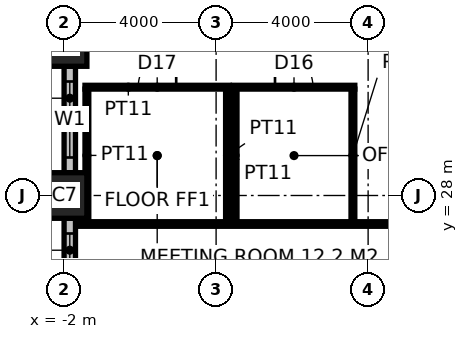
"""IFC4 building model, lengths in metres.
Left out: names, types, materials, properties, quantities, classifications, styles, units other than length and angle.
Written with IfcOpenShell. Run it as: python <this file> out.ifc"""

import sys

from ifc_helpers import new_model, si_unit, direction, frame, frame_2d, origin, origin_2d, place, context, subcontext, project, spatial, rectangle, hollow_rectangle, extrude, element, fill, save


model = new_model("IFC4")
c1 = context("Model", 3, precision=1e-05, world=origin(), true_north=direction((0.0, 1.0)))
c2 = subcontext(c1, "Body", "Model", "MODEL_VIEW")
j1 = project(units=[si_unit("LENGTHUNIT", "METRE"), si_unit("PLANEANGLEUNIT", "RADIAN")], contexts=[c1])
p1 = place(None, origin())
s1 = spatial("IfcSite", under=j1, at=p1, CompositionType="ELEMENT")
p2 = place(p1, origin())
s2 = spatial("IfcBuilding", under=s1, at=p2, CompositionType="ELEMENT")
p3 = place(p2, frame((0.0, 0.0, 15.0)))
s3 = spatial("IfcBuildingStorey", under=s2, at=p3, CompositionType="ELEMENT", Elevation=15.0)
for number, where, z_axis, x_axis in (
    (1, (-2.0, 28.0, 0.0), (0.0, 0.0, 1.0), (1.0, 0.0, 0.0)),
    (2, (-2.0, 32.0, 0.0), (0.0, 0.0, 1.0), (1.0, 0.0, 0.0)),
):
    element("IfcColumn", number, at=place(p3, frame(where, z_axis=z_axis, x_axis=x_axis)), inside=s3, PredefinedType="COLUMN", context=c2, shape_type="SweptSolid", body=[
        extrude(hollow_rectangle(XDim=1.2, YDim=1.2, WallThickness=0.1, at=origin_2d()), origin(), (0.0, 0.0, 1.0), 4.0),
    ])
p4 = place(p3, frame((-1.7, 27.25, 0.0), z_axis=(0.0, 0.0, 1.0), x_axis=(1.0, 0.0, 0.0)))
e3 = element("IfcWall", 3, at=p4, inside=s3, PredefinedType="PARTITIONING", context=c2, shape_type="SweptSolid", body=[
    extrude(rectangle(XDim=17.325, YDim=0.12, at=frame_2d((8.663, 0.0))), origin(), (0.0, 0.0, 1.0), 3.85),
])
p5 = place(p3, frame((-1.45, 30.85, 0.0), z_axis=(0.0, 0.0, 1.0), x_axis=(1.0, 0.0, 0.0)))
e4 = element("IfcWall", 4, at=p5, inside=s3, PredefinedType="PARTITIONING", context=c2, shape_type="SweptSolid", body=[
    extrude(rectangle(XDim=3.8, YDim=0.1, at=frame_2d((1.9, 0.0))), origin(), (0.0, 0.0, 1.0), 3.85),
])
p6 = place(p5, frame((1.4, 0.0, 0.0)))
e5 = element("IfcOpeningElement", 5, at=p6, cuts=e4, PredefinedType="OPENING", context=c2, shape_type="SweptSolid", body=[
    extrude(rectangle(XDim=1.0, YDim=2.2, at=frame_2d((0.5, 1.1))), frame((0.0, 0.06, 0.0), z_axis=(0.0, -1.0, 0.0), x_axis=(1.0, 0.0, 0.0)), (0.0, 0.0, 1.0), 0.12),
])
p7 = place(p3, frame((2.45, 30.85, 0.0), z_axis=(0.0, 0.0, 1.0), x_axis=(1.0, 0.0, 0.0)))
e6 = element("IfcWall", 6, at=p7, inside=s3, PredefinedType="PARTITIONING", context=c2, shape_type="SweptSolid", body=[
    extrude(rectangle(XDim=3.2, YDim=0.1, at=frame_2d((1.6, 0.0))), origin(), (0.0, 0.0, 1.0), 3.85),
])
p8 = place(p7, frame((1.1, 0.0, 0.0)))
e7 = element("IfcOpeningElement", 7, at=p8, cuts=e6, PredefinedType="OPENING", context=c2, shape_type="SweptSolid", body=[
    extrude(rectangle(XDim=1.0, YDim=2.2, at=frame_2d((0.5, 1.1))), frame((0.0, 0.06, 0.0), z_axis=(0.0, -1.0, 0.0), x_axis=(1.0, 0.0, 0.0)), (0.0, 0.0, 1.0), 0.12),
])
for number, where, z_axis, x_axis in (
    (8, (-1.4, 27.31, 0.0), (0.0, 0.0, 1.0), (0.0, 1.0, 0.0)),
    (9, (2.3, 27.31, 0.0), (0.0, 0.0, 1.0), (0.0, 1.0, 0.0)),
    (10, (2.5, 27.31, 0.0), (0.0, 0.0, 1.0), (0.0, 1.0, 0.0)),
    (11, (5.6, 27.31, 0.0), (0.0, 0.0, 1.0), (0.0, 1.0, 0.0)),
):
    element("IfcWall", number, at=place(p3, frame(where, z_axis=z_axis, x_axis=x_axis)), inside=s3, PredefinedType="PARTITIONING", context=c2, shape_type="SweptSolid", body=[
        extrude(rectangle(XDim=3.49, YDim=0.1, at=frame_2d((1.745, 0.0))), origin(), (0.0, 0.0, 1.0), 3.85),
    ])
p9 = place(p3, frame((-1.85, 27.4, 0.0), z_axis=(0.0, 0.0, 1.0), x_axis=(0.0, -1.0, 0.0)))
e12 = element("IfcWall", 12, at=p9, inside=s3, PredefinedType="ELEMENTEDWALL", context=c2, shape_type="SweptSolid", body=[
    extrude(rectangle(XDim=2.8, YDim=0.3, at=frame_2d((1.4, 0.0))), origin(), (0.0, 0.0, 1.0), 2.85),
])
p10 = place(p9, frame((0.4, 0.0, 0.8)))
e13 = element("IfcOpeningElement", 13, at=p10, cuts=e12, PredefinedType="OPENING", context=c2, shape_type="SweptSolid", body=[
    extrude(rectangle(XDim=2.0, YDim=2.0, at=frame_2d((1.0, 1.0))), frame((0.0, 0.16, 0.0), z_axis=(0.0, -1.0, 0.0), x_axis=(1.0, 0.0, 0.0)), (0.0, 0.0, 1.0), 0.32),
])
p11 = place(p3, frame((-1.85, 31.4, 0.0), z_axis=(0.0, 0.0, 1.0), x_axis=(0.0, -1.0, 0.0)))
e14 = element("IfcWall", 14, at=p11, inside=s3, PredefinedType="ELEMENTEDWALL", context=c2, shape_type="SweptSolid", body=[
    extrude(rectangle(XDim=2.8, YDim=0.3, at=frame_2d((1.4, 0.0))), origin(), (0.0, 0.0, 1.0), 2.85),
])
p12 = place(p11, frame((0.4, 0.0, 0.8)))
e15 = element("IfcOpeningElement", 15, at=p12, cuts=e14, PredefinedType="OPENING", context=c2, shape_type="SweptSolid", body=[
    extrude(rectangle(XDim=2.0, YDim=2.0, at=frame_2d((1.0, 1.0))), frame((0.0, 0.16, 0.0), z_axis=(0.0, -1.0, 0.0), x_axis=(1.0, 0.0, 0.0)), (0.0, 0.0, 1.0), 0.32),
])
p13 = place(p6, origin())
e16 = element("IfcDoor", 16, at=p13, inside=s3, OperationType="SINGLE_SWING_RIGHT", PredefinedType="DOOR", context=c2, shape_type="SweptSolid", body=[
    extrude(rectangle(XDim=1.0, YDim=2.2, at=frame_2d((0.5, 1.1))), frame((0.0, 0.025, 0.0), z_axis=(0.0, -1.0, 0.0), x_axis=(1.0, 0.0, 0.0)), (0.0, 0.0, 1.0), 0.05),
])
fill(e5, e16)
p14 = place(p8, origin())
e17 = element("IfcDoor", 17, at=p14, inside=s3, OperationType="SINGLE_SWING_LEFT", PredefinedType="DOOR", context=c2, shape_type="SweptSolid", body=[
    extrude(rectangle(XDim=1.0, YDim=2.2, at=frame_2d((0.5, 1.1))), frame((0.0, 0.025, 0.0), z_axis=(0.0, -1.0, 0.0), x_axis=(1.0, 0.0, 0.0)), (0.0, 0.0, 1.0), 0.05),
])
fill(e7, e17)
p15 = place(p10, origin())
e18 = element("IfcWindow", 18, at=p15, inside=s3, PartitioningType="SINGLE_PANEL", PredefinedType="WINDOW", context=c2, shape_type="SweptSolid", body=[
    extrude(rectangle(XDim=2.0, YDim=2.0, at=frame_2d((1.0, 1.0))), frame((0.0, 0.03, 0.0), z_axis=(0.0, -1.0, 0.0), x_axis=(1.0, 0.0, 0.0)), (0.0, 0.0, 1.0), 0.06),
])
fill(e13, e18)
p16 = place(p12, origin())
e19 = element("IfcWindow", 19, at=p16, inside=s3, PartitioningType="SINGLE_PANEL", PredefinedType="WINDOW", context=c2, shape_type="SweptSolid", body=[
    extrude(rectangle(XDim=2.0, YDim=2.0, at=frame_2d((1.0, 1.0))), frame((0.0, 0.03, 0.0), z_axis=(0.0, -1.0, 0.0), x_axis=(1.0, 0.0, 0.0)), (0.0, 0.0, 1.0), 0.06),
])
fill(e15, e19)
save(model, sys.argv[1])
